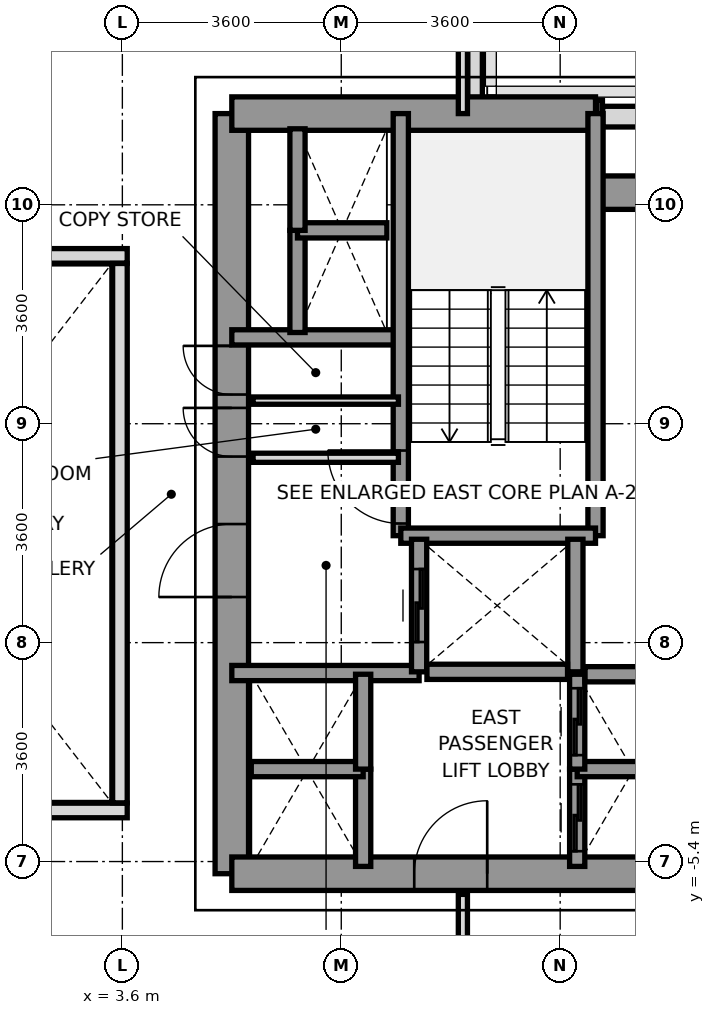
"""IFC4 building model, lengths in metres.
Left out: names, types, materials, properties, quantities, classifications, styles, units other than length and angle.
Written with IfcOpenShell. Run it as: python <this file> out.ifc"""

import sys

from ifc_helpers import new_model, si_unit, direction, frame, frame_2d, origin, place, context, subcontext, project, spatial, rectangle, extrude, source, transform, mapped, element, fill, save


model = new_model("IFC4")
c1 = context("Model", 3, precision=1e-05, world=origin(), true_north=direction((0.0, 1.0)))
c2 = subcontext(c1, "Body", "Model", "MODEL_VIEW")
j1 = project(units=[si_unit("LENGTHUNIT", "METRE"), si_unit("PLANEANGLEUNIT", "RADIAN")], contexts=[c1])
p1 = place(None, origin())
s1 = spatial("IfcSite", under=j1, at=p1, CompositionType="ELEMENT")
p2 = place(p1, origin())
s2 = spatial("IfcBuilding", under=s1, at=p2, CompositionType="ELEMENT")
p3 = place(p2, frame((0.0, 0.0, 54.4)))
s3 = spatial("IfcBuildingStorey", under=s2, at=p3, CompositionType="ELEMENT", Elevation=54.4)
p4 = place(p3, frame((11.498, 6.85, 0.0), z_axis=(0.0, 0.0, 1.0), x_axis=(1.0, 0.0, 0.0)))
e1 = element("IfcWall", 1, at=p4, inside=s3, PredefinedType="SOLIDWALL", context=c2, shape_type="SweptSolid", body=[
    extrude(rectangle(XDim=2.535, YDim=0.34, at=frame_2d((1.268, 0.0))), origin(), (0.0, 0.0, 1.0), 3.2),
])
p5 = place(p3, frame((9.4, 8.397, 0.0), z_axis=(0.0, 0.0, 1.0), x_axis=(0.0, -1.0, 0.0)))
e2 = element("IfcWall", 2, at=p5, inside=s3, PredefinedType="PARAPET", context=c2, shape_type="SweptSolid", body=[
    extrude(rectangle(XDim=1.444, YDim=0.24, at=frame_2d((0.722, 0.0))), origin(), (0.0, 0.0, 1.0), 1.15),
])
p6 = place(p3, frame((11.403, 7.0, 0.0), z_axis=(0.0, 0.0, 1.0), x_axis=(1.0, 0.0, 0.0)))
e3 = element("IfcWall", 3, at=p6, inside=s3, PredefinedType="PARAPET", context=c2, shape_type="SweptSolid", body=[
    extrude(rectangle(XDim=0.092, YDim=0.24, at=frame_2d((0.046, 0.0))), origin(), (0.0, 0.0, 1.0), 1.15),
])
p7 = place(p3, frame((5.4, -5.6, 0.0), z_axis=(0.0, 0.0, 1.0), x_axis=(0.0, 1.0, 0.0)))
e4 = element("IfcWall", 4, at=p7, inside=s3, PredefinedType="SHEAR", context=c2, shape_type="SweptSolid", body=[
    extrude(rectangle(XDim=12.5, YDim=0.55, at=frame_2d((6.25, 0.0))), origin(), (0.0, 0.0, 1.0), 3.2),
])
p8 = place(p7, frame((4.55, 0.0, 0.0)))
e5 = element("IfcOpeningElement", 5, at=p8, cuts=e4, PredefinedType="OPENING", context=c2, shape_type="SweptSolid", body=[
    extrude(rectangle(XDim=1.2, YDim=2.2, at=frame_2d((0.6, 1.1))), frame((0.0, 0.285, 0.0), z_axis=(0.0, -1.0, 0.0), x_axis=(1.0, 0.0, 0.0)), (0.0, 0.0, 1.0), 0.57),
])
p9 = place(p7, frame((6.86, 0.0, 0.0)))
e6 = element("IfcOpeningElement", 6, at=p9, cuts=e4, PredefinedType="OPENING", context=c2, shape_type="SweptSolid", body=[
    extrude(rectangle(XDim=0.8, YDim=2.1, at=frame_2d((0.4, 1.05))), frame((0.0, 0.285, 0.0), z_axis=(0.0, -1.0, 0.0), x_axis=(1.0, 0.0, 0.0)), (0.0, 0.0, 1.0), 0.57),
])
p10 = place(p7, frame((7.88, 0.0, 0.0)))
e7 = element("IfcOpeningElement", 7, at=p10, cuts=e4, PredefinedType="OPENING", context=c2, shape_type="SweptSolid", body=[
    extrude(rectangle(XDim=0.8, YDim=2.1, at=frame_2d((0.4, 1.05))), frame((0.0, 0.285, 0.0), z_axis=(0.0, -1.0, 0.0), x_axis=(1.0, 0.0, 0.0)), (0.0, 0.0, 1.0), 0.57),
])
p11 = place(p3, frame((5.4, 6.9, 0.0), z_axis=(0.0, 0.0, 1.0), x_axis=(1.0, 0.0, 0.0)))
e8 = element("IfcWall", 8, at=p11, inside=s3, PredefinedType="SHEAR", context=c2, shape_type="SweptSolid", body=[
    extrude(rectangle(XDim=5.981, YDim=0.55, at=frame_2d((2.991, 0.0))), origin(), (0.0, 0.0, 1.0), 3.2),
])
p12 = place(p3, frame((11.381, 5.6, 0.0), z_axis=(0.0, 0.0, 1.0), x_axis=(1.0, 0.0, 0.0)))
e9 = element("IfcWall", 9, at=p12, inside=s3, PredefinedType="SHEAR", context=c2, shape_type="SweptSolid", body=[
    extrude(rectangle(XDim=1.819, YDim=0.55, at=frame_2d((0.909, 0.0))), origin(), (0.0, 0.0, 1.0), 3.2),
])
p13 = place(p3, frame((5.4, -5.6, 0.0), z_axis=(0.0, 0.0, 1.0), x_axis=(1.0, 0.0, 0.0)))
e10 = element("IfcWall", 10, at=p13, inside=s3, PredefinedType="SHEAR", context=c2, shape_type="SweptSolid", body=[
    extrude(rectangle(XDim=7.8, YDim=0.55, at=frame_2d((3.9, 0.0))), origin(), (0.0, 0.0, 1.0), 3.2),
])
p14 = place(p13, frame((3.0, 0.0, 0.0)))
e11 = element("IfcOpeningElement", 11, at=p14, cuts=e10, PredefinedType="OPENING", context=c2, shape_type="SweptSolid", body=[
    extrude(rectangle(XDim=1.2, YDim=2.2, at=frame_2d((0.6, 1.1))), frame((0.0, 0.285, 0.0), z_axis=(0.0, -1.0, 0.0), x_axis=(1.0, 0.0, 0.0)), (0.0, 0.0, 1.0), 0.57),
])
p15 = place(p3, frame((5.4, 3.22, 0.0), z_axis=(0.0, 0.0, 1.0), x_axis=(1.0, 0.0, 0.0)))
e12 = element("IfcWall", 12, at=p15, inside=s3, PredefinedType="SOLIDWALL", context=c2, shape_type="SweptSolid", body=[
    extrude(rectangle(XDim=2.78, YDim=0.25, at=frame_2d((1.39, 0.0))), origin(), (0.0, 0.0, 1.0), 3.2),
])
p16 = place(p3, frame((5.4, -2.3, 0.0), z_axis=(0.0, 0.0, 1.0), x_axis=(1.0, 0.0, 0.0)))
e13 = element("IfcWall", 13, at=p16, inside=s3, PredefinedType="SOLIDWALL", context=c2, shape_type="SweptSolid", body=[
    extrude(rectangle(XDim=3.08, YDim=0.25, at=frame_2d((1.54, 0.0))), origin(), (0.0, 0.0, 1.0), 3.2),
])
p17 = place(p3, frame((8.179, -0.041, 0.0), z_axis=(0.0, 0.0, 1.0), x_axis=(0.0, 1.0, 0.0)))
e14 = element("IfcWall", 14, at=p17, inside=s3, PredefinedType="SOLIDWALL", context=c2, shape_type="SweptSolid", body=[
    extrude(rectangle(XDim=6.941, YDim=0.25, at=frame_2d((3.47, 0.0))), origin(), (0.0, 0.0, 1.0), 3.2),
])
p18 = place(p17, frame((0.2, 0.0, 0.0)))
e15 = element("IfcOpeningElement", 15, at=p18, cuts=e14, PredefinedType="OPENING", context=c2, shape_type="SweptSolid", body=[
    extrude(rectangle(XDim=1.2, YDim=2.2, at=frame_2d((0.6, 1.1))), frame((0.0, 0.135, 0.0), z_axis=(0.0, -1.0, 0.0), x_axis=(1.0, 0.0, 0.0)), (0.0, 0.0, 1.0), 0.27),
])
p19 = place(p3, frame((11.381, -0.041, 0.0), z_axis=(0.0, 0.0, 1.0), x_axis=(0.0, 1.0, 0.0)))
e16 = element("IfcWall", 16, at=p19, inside=s3, PredefinedType="SOLIDWALL", context=c2, shape_type="SweptSolid", body=[
    extrude(rectangle(XDim=6.941, YDim=0.25, at=frame_2d((3.47, 0.0))), origin(), (0.0, 0.0, 1.0), 3.2),
])
p20 = place(p3, frame((8.179, -0.041, 0.0), z_axis=(0.0, 0.0, 1.0), x_axis=(1.0, 0.0, 0.0)))
e17 = element("IfcWall", 17, at=p20, inside=s3, PredefinedType="SOLIDWALL", context=c2, shape_type="SweptSolid", body=[
    extrude(rectangle(XDim=3.202, YDim=0.25, at=frame_2d((1.601, 0.0))), origin(), (0.0, 0.0, 1.0), 3.2),
])
p21 = place(p3, frame((8.48, -2.28, 0.0), z_axis=(0.0, 0.0, 1.0), x_axis=(0.0, 1.0, 0.0)))
e18 = element("IfcWall", 18, at=p21, inside=s3, PredefinedType="SOLIDWALL", context=c2, shape_type="SweptSolid", body=[
    extrude(rectangle(XDim=2.18, YDim=0.25, at=frame_2d((1.09, 0.0))), origin(), (0.0, 0.0, 1.0), 3.2),
])
p22 = place(p21, frame((0.49, 0.0, 0.0)))
e19 = element("IfcOpeningElement", 19, at=p22, cuts=e18, PredefinedType="OPENING", context=c2, shape_type="SweptSolid", body=[
    extrude(rectangle(XDim=1.2, YDim=2.2, at=frame_2d((0.6, 1.1))), frame((0.0, 0.135, 0.0), z_axis=(0.0, -1.0, 0.0), x_axis=(1.0, 0.0, 0.0)), (0.0, 0.0, 1.0), 0.27),
])
p23 = place(p3, frame((11.05, -2.28, 0.0), z_axis=(0.0, 0.0, 1.0), x_axis=(0.0, 1.0, 0.0)))
e20 = element("IfcWall", 20, at=p23, inside=s3, PredefinedType="SOLIDWALL", context=c2, shape_type="SweptSolid", body=[
    extrude(rectangle(XDim=2.18, YDim=0.25, at=frame_2d((1.09, 0.0))), origin(), (0.0, 0.0, 1.0), 3.2),
])
p24 = place(p3, frame((8.609, -2.28, 0.0), z_axis=(0.0, 0.0, 1.0), x_axis=(1.0, 0.0, 0.0)))
e21 = element("IfcWall", 21, at=p24, inside=s3, PredefinedType="SOLIDWALL", context=c2, shape_type="SweptSolid", body=[
    extrude(rectangle(XDim=2.312, YDim=0.25, at=frame_2d((1.156, 0.0))), origin(), (0.0, 0.0, 1.0), 3.2),
])
p25 = place(p3, frame((11.08, -5.48, 0.0), z_axis=(0.0, 0.0, 1.0), x_axis=(0.0, 1.0, 0.0)))
e22 = element("IfcWall", 22, at=p25, inside=s3, PredefinedType="SOLIDWALL", context=c2, shape_type="SweptSolid", body=[
    extrude(rectangle(XDim=1.6, YDim=0.25, at=frame_2d((0.8, 0.0))), origin(), (0.0, 0.0, 1.0), 3.2),
])
p26 = place(p25, frame((0.25, 0.0, 0.0)))
e23 = element("IfcOpeningElement", 23, at=p26, cuts=e22, PredefinedType="OPENING", context=c2, shape_type="SweptSolid", body=[
    extrude(rectangle(XDim=1.1, YDim=2.2, at=frame_2d((0.55, 1.1))), frame((0.0, 0.135, 0.0), z_axis=(0.0, -1.0, 0.0), x_axis=(1.0, 0.0, 0.0)), (0.0, 0.0, 1.0), 0.27),
])
p27 = place(p3, frame((11.08, -3.88, 0.0), z_axis=(0.0, 0.0, 1.0), x_axis=(1.0, 0.0, 0.0)))
e24 = element("IfcWall", 24, at=p27, inside=s3, PredefinedType="SOLIDWALL", context=c2, shape_type="SweptSolid", body=[
    extrude(rectangle(XDim=1.84, YDim=0.25, at=frame_2d((0.92, 0.0))), origin(), (0.0, 0.0, 1.0), 3.2),
])
p28 = place(p3, frame((11.08, -3.88, 0.0), z_axis=(0.0, 0.0, 1.0), x_axis=(0.0, 1.0, 0.0)))
e25 = element("IfcWall", 25, at=p28, inside=s3, PredefinedType="SOLIDWALL", context=c2, shape_type="SweptSolid", body=[
    extrude(rectangle(XDim=1.56, YDim=0.25, at=frame_2d((0.78, 0.0))), origin(), (0.0, 0.0, 1.0), 3.2),
])
p29 = place(p28, frame((0.23, 0.0, 0.0)))
e26 = element("IfcOpeningElement", 26, at=p29, cuts=e25, PredefinedType="OPENING", context=c2, shape_type="SweptSolid", body=[
    extrude(rectangle(XDim=1.1, YDim=2.2, at=frame_2d((0.55, 1.1))), frame((0.0, 0.135, 0.0), z_axis=(0.0, -1.0, 0.0), x_axis=(1.0, 0.0, 0.0)), (0.0, 0.0, 1.0), 0.27),
])
p30 = place(p3, frame((11.209, -2.32, 0.0), z_axis=(0.0, 0.0, 1.0), x_axis=(1.0, 0.0, 0.0)))
e27 = element("IfcWall", 27, at=p30, inside=s3, PredefinedType="SOLIDWALL", context=c2, shape_type="SweptSolid", body=[
    extrude(rectangle(XDim=1.582, YDim=0.25, at=frame_2d((0.791, 0.0))), origin(), (0.0, 0.0, 1.0), 3.2),
])
p31 = place(p3, frame((7.56, -5.48, 0.0), z_axis=(0.0, 0.0, 1.0), x_axis=(0.0, 1.0, 0.0)))
e28 = element("IfcWall", 28, at=p31, inside=s3, PredefinedType="SOLIDWALL", context=c2, shape_type="SweptSolid", body=[
    extrude(rectangle(XDim=1.6, YDim=0.25, at=frame_2d((0.8, 0.0))), origin(), (0.0, 0.0, 1.0), 3.2),
])
p32 = place(p3, frame((5.72, -3.88, 0.0), z_axis=(0.0, 0.0, 1.0), x_axis=(1.0, 0.0, 0.0)))
e29 = element("IfcWall", 29, at=p32, inside=s3, PredefinedType="SOLIDWALL", context=c2, shape_type="SweptSolid", body=[
    extrude(rectangle(XDim=1.84, YDim=0.25, at=frame_2d((0.92, 0.0))), origin(), (0.0, 0.0, 1.0), 3.2),
])
p33 = place(p3, frame((7.56, -3.88, 0.0), z_axis=(0.0, 0.0, 1.0), x_axis=(0.0, 1.0, 0.0)))
e30 = element("IfcWall", 30, at=p33, inside=s3, PredefinedType="SOLIDWALL", context=c2, shape_type="SweptSolid", body=[
    extrude(rectangle(XDim=1.56, YDim=0.25, at=frame_2d((0.78, 0.0))), origin(), (0.0, 0.0, 1.0), 3.2),
])
p34 = place(p3, frame((6.48, 3.3, 0.0), z_axis=(0.0, 0.0, 1.0), x_axis=(0.0, 1.0, 0.0)))
e31 = element("IfcWall", 31, at=p34, inside=s3, PredefinedType="SOLIDWALL", context=c2, shape_type="SweptSolid", body=[
    extrude(rectangle(XDim=1.68, YDim=0.25, at=frame_2d((0.84, 0.0))), origin(), (0.0, 0.0, 1.0), 3.2),
])
p35 = place(p3, frame((6.48, 4.98, 0.0), z_axis=(0.0, 0.0, 1.0), x_axis=(1.0, 0.0, 0.0)))
e32 = element("IfcWall", 32, at=p35, inside=s3, PredefinedType="SOLIDWALL", context=c2, shape_type="SweptSolid", body=[
    extrude(rectangle(XDim=1.47, YDim=0.25, at=frame_2d((0.735, 0.0))), origin(), (0.0, 0.0, 1.0), 3.2),
])
p36 = place(p3, frame((6.48, 4.98, 0.0), z_axis=(0.0, 0.0, 1.0), x_axis=(0.0, 1.0, 0.0)))
e33 = element("IfcWall", 33, at=p36, inside=s3, PredefinedType="SOLIDWALL", context=c2, shape_type="SweptSolid", body=[
    extrude(rectangle(XDim=1.67, YDim=0.25, at=frame_2d((0.835, 0.0))), origin(), (0.0, 0.0, 1.0), 3.2),
])
p37 = place(p3, frame((5.75, 1.24, 0.0), z_axis=(0.0, 0.0, 1.0), x_axis=(1.0, 0.0, 0.0)))
e34 = element("IfcWall", 34, at=p37, inside=s3, PredefinedType="PARTITIONING", context=c2, shape_type="SweptSolid", body=[
    extrude(rectangle(XDim=2.39, YDim=0.15, at=frame_2d((1.195, 0.0))), origin(), (0.0, 0.0, 1.0), 2.3),
])
p38 = place(p3, frame((5.75, 2.18, 0.0), z_axis=(0.0, 0.0, 1.0), x_axis=(1.0, 0.0, 0.0)))
e35 = element("IfcWall", 35, at=p38, inside=s3, PredefinedType="PARTITIONING", context=c2, shape_type="SweptSolid", body=[
    extrude(rectangle(XDim=2.39, YDim=0.12, at=frame_2d((1.195, 0.0))), origin(), (0.0, 0.0, 1.0), 2.3),
])
p39 = place(p3, frame((9.2, 6.9, 0.0), z_axis=(0.0, 0.0, 1.0), x_axis=(0.0, 1.0, 0.0)))
e36 = element("IfcWall", 36, at=p39, inside=s3, PredefinedType="PARTITIONING", context=c2, shape_type="SweptSolid", body=[
    extrude(rectangle(XDim=8.78, YDim=0.15, at=frame_2d((4.39, 0.0))), origin(), (0.0, 0.0, 1.0), 2.71),
])
p40 = place(p3, frame((9.2, -15.68, 0.0), z_axis=(0.0, 0.0, 1.0), x_axis=(0.0, 1.0, 0.0)))
e37 = element("IfcWall", 37, at=p40, inside=s3, PredefinedType="PARTITIONING", context=c2, shape_type="SweptSolid", body=[
    extrude(rectangle(XDim=9.74, YDim=0.15, at=frame_2d((4.87, 0.0))), origin(), (0.0, 0.0, 1.0), 2.71),
])
for number, where, z_axis, x_axis in (
    (38, (-3.68, -4.56, 0.0), (0.0, 0.0, 1.0), (1.0, 0.0, 0.0)),
    (39, (-3.68, 4.56, 0.0), (0.0, 0.0, 1.0), (1.0, 0.0, 0.0)),
):
    element("IfcWall", number, at=place(p3, frame(where, z_axis=z_axis, x_axis=x_axis)), inside=s3, PredefinedType="PARAPET", context=c2, shape_type="SweptSolid", body=[
        extrude(rectangle(XDim=7.36, YDim=0.24, at=frame_2d((3.68, 0.0))), origin(), (0.0, 0.0, 1.0), 1.15),
    ])
p41 = place(p3, frame((3.56, -4.435, 0.0), z_axis=(0.0, 0.0, 1.0), x_axis=(0.0, 1.0, 0.0)))
e40 = element("IfcWall", 40, at=p41, inside=s3, PredefinedType="PARAPET", context=c2, shape_type="SweptSolid", body=[
    extrude(rectangle(XDim=8.87, YDim=0.24, at=frame_2d((4.435, 0.0))), origin(), (0.0, 0.0, 1.0), 1.15),
])
m1 = source(origin(), c2, "Body", "SweptSolid", [
    extrude(rectangle(XDim=1.2, YDim=2.2, at=frame_2d((0.6, 1.1))), frame((0.0, 0.025, 0.0), z_axis=(0.0, -1.0, 0.0), x_axis=(1.0, 0.0, 0.0)), (0.0, 0.0, 1.0), 0.05),
])
p42 = place(p18, origin())
e41 = element("IfcDoor", 41, at=p42, inside=s3, OperationType="SINGLE_SWING_RIGHT", PredefinedType="DOOR", context=c2, shape_type="MappedRepresentation", body=[
    mapped(m1, transform((0.0, 0.0, 0.0), x_axis=(1.0, 0.0, 0.0), y_axis=(0.0, 1.0, 0.0), z_axis=(0.0, 0.0, 1.0), scale=1.0)),
])
fill(e15, e41)
p43 = place(p8, origin())
e42 = element("IfcDoor", 42, at=p43, inside=s3, OperationType="SINGLE_SWING_LEFT", PredefinedType="DOOR", context=c2, shape_type="MappedRepresentation", body=[
    mapped(m1, transform((0.0, 0.0, 0.0), x_axis=(1.0, 0.0, 0.0), y_axis=(0.0, 1.0, 0.0), z_axis=(0.0, 0.0, 1.0), scale=1.0)),
])
fill(e5, e42)
p44 = place(p14, origin())
e43 = element("IfcDoor", 43, at=p44, inside=s3, OperationType="SINGLE_SWING_RIGHT", PredefinedType="DOOR", context=c2, shape_type="MappedRepresentation", body=[
    mapped(m1, transform((0.0, 0.0, 0.0), x_axis=(1.0, 0.0, 0.0), y_axis=(0.0, 1.0, 0.0), z_axis=(0.0, 0.0, 1.0), scale=1.0)),
])
fill(e11, e43)
m2 = source(origin(), c2, "Body", "SweptSolid", [
    extrude(rectangle(XDim=0.8, YDim=2.1, at=frame_2d((0.4, 1.05))), frame((0.0, 0.025, 0.0), z_axis=(0.0, -1.0, 0.0), x_axis=(1.0, 0.0, 0.0)), (0.0, 0.0, 1.0), 0.05),
])
p45 = place(p9, origin())
e44 = element("IfcDoor", 44, at=p45, inside=s3, OperationType="SINGLE_SWING_RIGHT", PredefinedType="DOOR", context=c2, shape_type="MappedRepresentation", body=[
    mapped(m2, transform((0.0, 0.0, 0.0), x_axis=(1.0, 0.0, 0.0), y_axis=(0.0, 1.0, 0.0), z_axis=(0.0, 0.0, 1.0), scale=1.0)),
])
fill(e6, e44)
p46 = place(p10, origin())
e45 = element("IfcDoor", 45, at=p46, inside=s3, OperationType="SINGLE_SWING_RIGHT", PredefinedType="DOOR", context=c2, shape_type="MappedRepresentation", body=[
    mapped(m2, transform((0.0, 0.0, 0.0), x_axis=(1.0, 0.0, 0.0), y_axis=(0.0, 1.0, 0.0), z_axis=(0.0, 0.0, 1.0), scale=1.0)),
])
fill(e7, e45)
p47 = place(p22, origin())
e46 = element("IfcDoor", 46, at=p47, inside=s3, OperationType="SLIDING_TO_RIGHT", PredefinedType="DOOR", context=c2, shape_type="MappedRepresentation", body=[
    mapped(m1, transform((0.0, 0.0, 0.0), x_axis=(1.0, 0.0, 0.0), y_axis=(0.0, 1.0, 0.0), z_axis=(0.0, 0.0, 1.0), scale=1.0)),
])
fill(e19, e46)
m3 = source(origin(), c2, "Body", "SweptSolid", [
    extrude(rectangle(XDim=1.1, YDim=2.2, at=frame_2d((0.55, 1.1))), frame((0.0, 0.025, 0.0), z_axis=(0.0, -1.0, 0.0), x_axis=(1.0, 0.0, 0.0)), (0.0, 0.0, 1.0), 0.05),
])
p48 = place(p26, origin())
e47 = element("IfcDoor", 47, at=p48, inside=s3, OperationType="SLIDING_TO_LEFT", PredefinedType="DOOR", context=c2, shape_type="MappedRepresentation", body=[
    mapped(m3, transform((0.0, 0.0, 0.0), x_axis=(1.0, 0.0, 0.0), y_axis=(0.0, 1.0, 0.0), z_axis=(0.0, 0.0, 1.0), scale=1.0)),
])
fill(e23, e47)
p49 = place(p29, origin())
e48 = element("IfcDoor", 48, at=p49, inside=s3, OperationType="SLIDING_TO_LEFT", PredefinedType="DOOR", context=c2, shape_type="MappedRepresentation", body=[
    mapped(m3, transform((0.0, 0.0, 0.0), x_axis=(1.0, 0.0, 0.0), y_axis=(0.0, 1.0, 0.0), z_axis=(0.0, 0.0, 1.0), scale=1.0)),
])
fill(e26, e48)
save(model, sys.argv[1])
